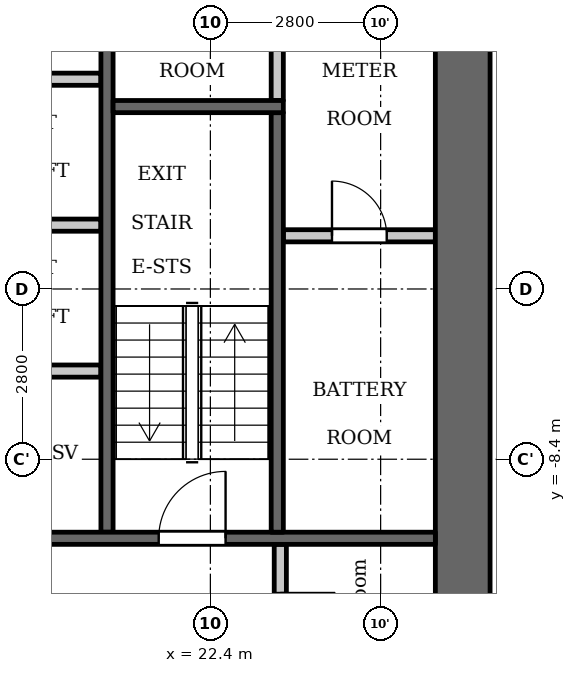
"""IFC4 building model, lengths in metres.
Left out: names, types, materials, properties, quantities, classifications, styles, units other than length and angle.
Written with IfcOpenShell. Run it as: python <this file> out.ifc"""

import sys

from ifc_helpers import new_model, si_unit, direction, frame, frame_2d, origin, place, context, subcontext, project, spatial, rectangle, extrude, element, fill, save


model = new_model("IFC4")
c1 = context("Model", 3, precision=1e-05, world=origin(), true_north=direction((0.0, 1.0)))
c2 = subcontext(c1, "Body", "Model", "MODEL_VIEW")
j1 = project(units=[si_unit("LENGTHUNIT", "METRE"), si_unit("PLANEANGLEUNIT", "RADIAN")], contexts=[c1])
p1 = place(None, origin())
s1 = spatial("IfcSite", under=j1, at=p1, CompositionType="ELEMENT")
p2 = place(p1, origin())
s2 = spatial("IfcBuilding", under=s1, at=p2, CompositionType="ELEMENT")
p3 = place(p2, frame((0.0, 0.0, 121.8)))
s3 = spatial("IfcBuildingStorey", under=s2, at=p3, CompositionType="ELEMENT", Elevation=121.8)
p4 = place(p3, frame((23.5, -2.5, 0.0), z_axis=(0.0, 0.0, 1.0), x_axis=(0.0, 1.0, 0.0)))
e1 = element("IfcWall", 1, at=p4, inside=s3, PredefinedType="PARTITIONING", context=c2, shape_type="SweptSolid", body=[
    extrude(rectangle(XDim=2.65, YDim=0.2, at=frame_2d((1.325, 0.0))), origin(), (0.0, 0.0, 1.0), 3.15),
])
p5 = place(p3, frame((20.7, -9.6, 0.0), z_axis=(0.0, 0.0, 1.0), x_axis=(0.0, 1.0, 0.0)))
e2 = element("IfcWall", 2, at=p5, inside=s3, PredefinedType="SHEAR", context=c2, shape_type="SweptSolid", body=[
    extrude(rectangle(XDim=9.75, YDim=0.2, at=frame_2d((4.875, 0.0))), origin(), (0.0, 0.0, 1.0), 3.15),
])
p6 = place(p3, frame((26.55, -12.3, 0.0), z_axis=(0.0, 0.0, 1.0), x_axis=(0.0, 1.0, 0.0)))
e3 = element("IfcWall", 3, at=p6, inside=s3, PredefinedType="SHEAR", context=c2, shape_type="SweptSolid", body=[
    extrude(rectangle(XDim=24.6, YDim=0.9, at=frame_2d((12.3, 0.0))), origin(), (0.0, 0.0, 1.0), 3.15),
])
p7 = place(p3, frame((23.55, -12.3, 0.0), z_axis=(0.0, 0.0, 1.0), x_axis=(0.0, 1.0, 0.0)))
e4 = element("IfcWall", 4, at=p7, inside=s3, PredefinedType="PARTITIONING", context=c2, shape_type="SweptSolid", body=[
    extrude(rectangle(XDim=2.5, YDim=0.2, at=frame_2d((1.25, 0.0))), origin(), (0.0, 0.0, 1.0), 3.15),
])
p8 = place(p7, frame((0.8, 0.0, 0.0)))
e5 = element("IfcOpeningElement", 5, at=p8, cuts=e4, PredefinedType="OPENING", context=c2, shape_type="SweptSolid", body=[
    extrude(rectangle(XDim=0.9, YDim=2.1, at=frame_2d((0.45, 1.05))), frame((0.0, 0.11, 0.0), z_axis=(0.0, -1.0, 0.0), x_axis=(1.0, 0.0, 0.0)), (0.0, 0.0, 1.0), 0.22),
])
p9 = place(p3, frame((23.6, -4.725, 0.0), z_axis=(0.0, 0.0, 1.0), x_axis=(1.0, 0.0, 0.0)))
e6 = element("IfcWall", 6, at=p9, inside=s3, PredefinedType="PARTITIONING", context=c2, shape_type="SweptSolid", body=[
    extrude(rectangle(XDim=2.5, YDim=0.2, at=frame_2d((1.25, 0.0))), origin(), (0.0, 0.0, 1.0), 3.15),
])
p10 = place(p9, frame((0.8, 0.0, 0.0)))
e7 = element("IfcOpeningElement", 7, at=p10, cuts=e6, PredefinedType="OPENING", context=c2, shape_type="SweptSolid", body=[
    extrude(rectangle(XDim=0.9, YDim=2.1, at=frame_2d((0.45, 1.05))), frame((0.0, 0.11, 0.0), z_axis=(0.0, -1.0, 0.0), x_axis=(1.0, 0.0, 0.0)), (0.0, 0.0, 1.0), 0.22),
])
p11 = place(p3, frame((17.8, -9.7, 0.0), z_axis=(0.0, 0.0, 1.0), x_axis=(1.0, 0.0, 0.0)))
e8 = element("IfcWall", 8, at=p11, inside=s3, PredefinedType="SHEAR", context=c2, shape_type="SweptSolid", body=[
    extrude(rectangle(XDim=8.3, YDim=0.2, at=frame_2d((4.15, 0.0))), origin(), (0.0, 0.0, 1.0), 3.15),
])
p12 = place(p11, frame((0.85, 0.0, 0.0)))
e9 = element("IfcOpeningElement", 9, at=p12, cuts=e8, PredefinedType="OPENING", context=c2, shape_type="SweptSolid", body=[
    extrude(rectangle(XDim=1.1, YDim=2.1, at=frame_2d((0.55, 1.05))), frame((0.0, 0.11, 0.0), z_axis=(0.0, -1.0, 0.0), x_axis=(1.0, 0.0, 0.0)), (0.0, 0.0, 1.0), 0.22),
])
p13 = place(p11, frame((3.75, 0.0, 0.0)))
e10 = element("IfcOpeningElement", 10, at=p13, cuts=e8, PredefinedType="OPENING", context=c2, shape_type="SweptSolid", body=[
    extrude(rectangle(XDim=1.1, YDim=2.1, at=frame_2d((0.55, 1.05))), frame((0.0, 0.11, 0.0), z_axis=(0.0, -1.0, 0.0), x_axis=(1.0, 0.0, 0.0)), (0.0, 0.0, 1.0), 0.22),
])
for number, where, z_axis, x_axis in (
    (11, (17.8, -6.95, 0.0), (0.0, 0.0, 1.0), (1.0, 0.0, 0.0)),
    (12, (17.8, -4.55, 0.0), (0.0, 0.0, 1.0), (1.0, 0.0, 0.0)),
    (13, (17.8, -2.15, 0.0), (0.0, 0.0, 1.0), (1.0, 0.0, 0.0)),
):
    element("IfcWall", number, at=place(p3, frame(where, z_axis=z_axis, x_axis=x_axis)), inside=s3, PredefinedType="PARTITIONING", context=c2, shape_type="SweptSolid", body=[
        extrude(rectangle(XDim=2.8, YDim=0.2, at=frame_2d((1.4, 0.0))), origin(), (0.0, 0.0, 1.0), 3.15),
    ])
p14 = place(p3, frame((23.5, -9.6, 0.0), z_axis=(0.0, 0.0, 1.0), x_axis=(0.0, 1.0, 0.0)))
e14 = element("IfcWall", 14, at=p14, inside=s3, PredefinedType="SHEAR", context=c2, shape_type="SweptSolid", body=[
    extrude(rectangle(XDim=6.9, YDim=0.2, at=frame_2d((3.45, 0.0))), origin(), (0.0, 0.0, 1.0), 3.15),
])
p15 = place(p3, frame((20.8, -2.6, 0.0), z_axis=(0.0, 0.0, 1.0), x_axis=(1.0, 0.0, 0.0)))
e15 = element("IfcWall", 15, at=p15, inside=s3, PredefinedType="SHEAR", context=c2, shape_type="SweptSolid", body=[
    extrude(rectangle(XDim=2.8, YDim=0.2, at=frame_2d((1.4, 0.0))), origin(), (0.0, 0.0, 1.0), 3.15),
])
p16 = place(p13, origin())
e16 = element("IfcDoor", 16, at=p16, inside=s3, OperationType="SINGLE_SWING_LEFT", PredefinedType="DOOR", context=c2, shape_type="SweptSolid", body=[
    extrude(rectangle(XDim=1.1, YDim=2.1, at=frame_2d((0.55, 1.05))), frame((0.0, 0.025, 0.0), z_axis=(0.0, -1.0, 0.0), x_axis=(1.0, 0.0, 0.0)), (0.0, 0.0, 1.0), 0.05),
])
fill(e10, e16)
p17 = place(p10, origin())
e17 = element("IfcDoor", 17, at=p17, inside=s3, OperationType="SINGLE_SWING_RIGHT", PredefinedType="DOOR", context=c2, shape_type="SweptSolid", body=[
    extrude(rectangle(XDim=0.9, YDim=2.1, at=frame_2d((0.45, 1.05))), frame((0.0, 0.025, 0.0), z_axis=(0.0, -1.0, 0.0), x_axis=(1.0, 0.0, 0.0)), (0.0, 0.0, 1.0), 0.05),
])
fill(e7, e17)
save(model, sys.argv[1])
